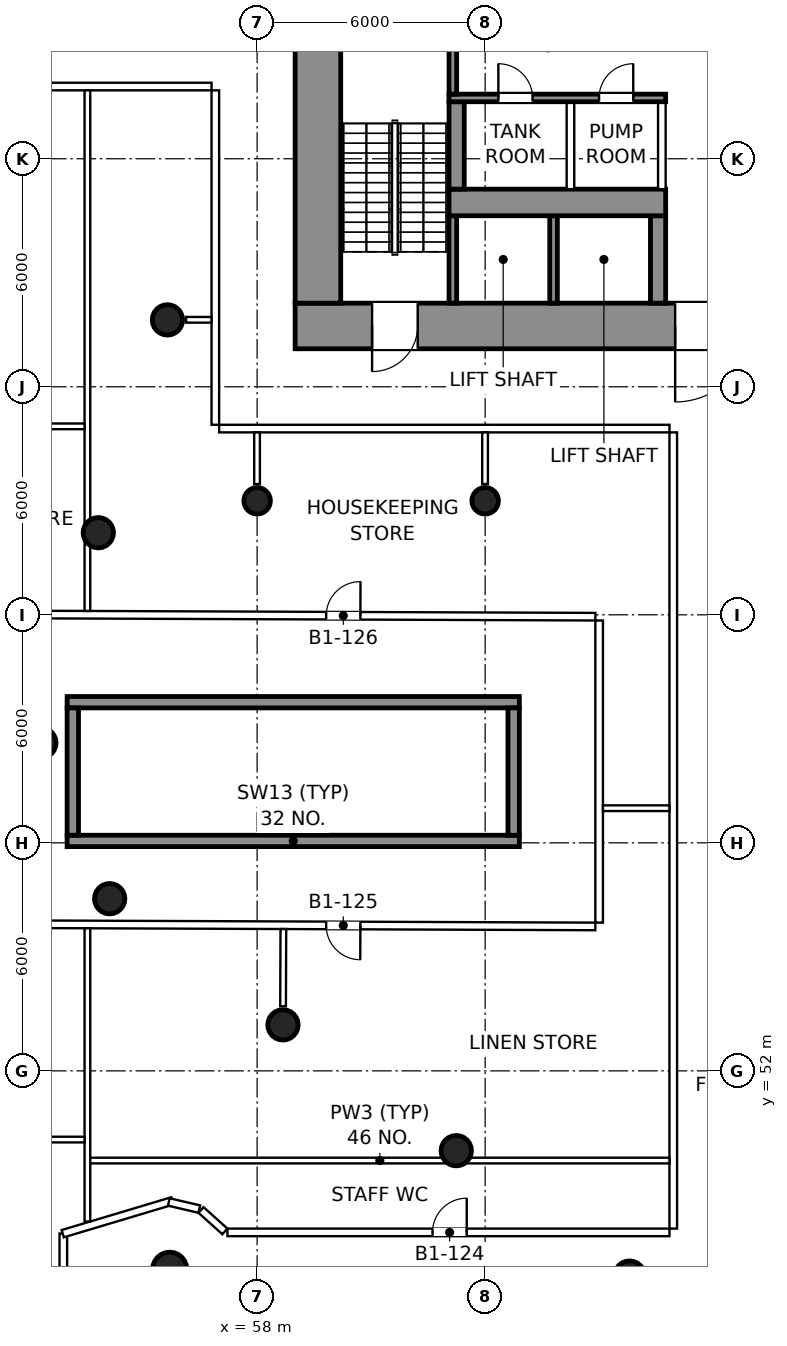
"""IFC4 building model, lengths in metres.
Left out: names, types, materials, properties, quantities, classifications, styles, units other than length and angle.
Written with IfcOpenShell. Run it as: python <this file> out.ifc"""

import sys

from ifc_helpers import new_model, si_unit, direction, frame, frame_2d, origin, origin_2d, place, context, subcontext, project, spatial, rectangle, circle, extrude, element, fill, save


model = new_model("IFC4")
c1 = context("Model", 3, precision=1e-05, world=origin(), true_north=direction((0.0, 1.0)))
c2 = subcontext(c1, "Body", "Model", "MODEL_VIEW")
j1 = project(units=[si_unit("LENGTHUNIT", "METRE"), si_unit("PLANEANGLEUNIT", "RADIAN")], contexts=[c1])
p1 = place(None, origin())
s1 = spatial("IfcSite", under=j1, at=p1, CompositionType="ELEMENT")
p2 = place(p1, origin())
s2 = spatial("IfcBuilding", under=s1, at=p2, CompositionType="ELEMENT")
p3 = place(p2, frame((0.0, 0.0, -5.0)))
s3 = spatial("IfcBuildingStorey", under=s2, at=p3, CompositionType="ELEMENT", Elevation=-5.0)
p4 = place(p3, frame((55.7, 46.78, 0.0), z_axis=(0.0, 0.0, 1.0), x_axis=(1.0, 0.0, 0.0)))
e1 = element("IfcColumn", 1, at=p4, inside=s3, PredefinedType="COLUMN", context=c2, shape_type="SweptSolid", body=[
    extrude(circle(Radius=0.45, at=origin_2d()), origin(), (0.0, 0.0, 1.0), 5.0),
])
for number, where, z_axis, x_axis in (
    (2, (52.31, 60.63, 0.0), (0.0, 0.0, 1.0), (1.0, 0.0, 0.0)),
    (3, (54.12, 56.53, 0.0), (0.0, 0.0, 1.0), (1.0, 0.0, 0.0)),
    (4, (58.68, 53.21, 0.0), (0.0, 0.0, 1.0), (1.0, 0.0, 0.0)),
    (5, (63.24, 49.9, 0.0), (0.0, 0.0, 1.0), (1.0, 0.0, 0.0)),
    (6, (67.8, 46.6, 0.0), (0.0, 0.0, 1.0), (1.0, 0.0, 0.0)),
    (7, (55.64, 71.76, 0.0), (0.0, 0.0, 1.0), (1.0, 0.0, 0.0)),
    (8, (53.82, 66.16, 0.0), (0.0, 0.0, 1.0), (1.0, 0.0, 0.0)),
):
    element("IfcColumn", number, at=place(p3, frame(where, z_axis=z_axis, x_axis=x_axis)), inside=s3, PredefinedType="COLUMN", context=c2, shape_type="SweptSolid", body=[
        extrude(circle(Radius=0.4, at=origin_2d()), origin(), (0.0, 0.0, 1.0), 5.0),
    ])
for number, where, z_axis, x_axis in (
    (9, (58.0, 67.0, 0.0), (0.0, 0.0, 1.0), (1.0, 0.0, 0.0)),
    (10, (64.0, 67.0, 0.0), (0.0, 0.0, 1.0), (1.0, 0.0, 0.0)),
):
    element("IfcColumn", number, at=place(p3, frame(where, z_axis=z_axis, x_axis=x_axis)), inside=s3, PredefinedType="COLUMN", context=c2, shape_type="SweptSolid", body=[
        extrude(circle(Radius=0.35, at=origin_2d()), origin(), (0.0, 0.0, 1.0), 5.0),
    ])
p5 = place(p3, frame((59.0, 71.6, 0.0), z_axis=(0.0, 0.0, 1.0), x_axis=(1.0, 0.0, 0.0)))
e11 = element("IfcWall", 11, at=p5, inside=s3, PredefinedType="SHEAR", context=c2, shape_type="SweptSolid", body=[
    extrude(rectangle(XDim=22.0, YDim=1.2, at=frame_2d((11.0, 0.0))), origin(), (0.0, 0.0, 1.0), 5.0),
])
p6 = place(p5, frame((2.025, 0.0, 0.0)))
e12 = element("IfcOpeningElement", 12, at=p6, cuts=e11, PredefinedType="OPENING", context=c2, shape_type="SweptSolid", body=[
    extrude(rectangle(XDim=1.2, YDim=2.1, at=frame_2d((0.6, 1.05))), frame((0.0, 0.61, 0.0), z_axis=(0.0, -1.0, 0.0), x_axis=(1.0, 0.0, 0.0)), (0.0, 0.0, 1.0), 1.22),
])
p7 = place(p5, frame((18.775, 0.0, 0.0)))
e13 = element("IfcOpeningElement", 13, at=p7, cuts=e11, PredefinedType="OPENING", context=c2, shape_type="SweptSolid", body=[
    extrude(rectangle(XDim=1.2, YDim=2.1, at=frame_2d((0.6, 1.05))), frame((0.0, 0.61, 0.0), z_axis=(0.0, -1.0, 0.0), x_axis=(1.0, 0.0, 0.0)), (0.0, 0.0, 1.0), 1.22),
])
p8 = place(p5, frame((10.0, 0.0, 0.0)))
e14 = element("IfcOpeningElement", 14, at=p8, cuts=e11, PredefinedType="OPENING", context=c2, shape_type="SweptSolid", body=[
    extrude(rectangle(XDim=2.0, YDim=2.1, at=frame_2d((1.0, 1.05))), frame((0.0, 0.61, 0.0), z_axis=(0.0, -1.0, 0.0), x_axis=(1.0, 0.0, 0.0)), (0.0, 0.0, 1.0), 1.22),
])
p9 = place(p3, frame((59.6, 72.2, 0.0), z_axis=(0.0, 0.0, 1.0), x_axis=(0.0, 1.0, 0.0)))
e15 = element("IfcWall", 15, at=p9, inside=s3, PredefinedType="SHEAR", context=c2, shape_type="SweptSolid", body=[
    extrude(rectangle(XDim=8.7, YDim=1.2, at=frame_2d((4.35, 0.0))), origin(), (0.0, 0.0, 1.0), 5.0),
])
for number, where, z_axis, x_axis in (
    (16, (63.15, 72.2, 0.0), (0.0, 0.0, 1.0), (0.0, 1.0, 0.0)),
    (17, (65.8, 72.2, 0.0), (0.0, 0.0, 1.0), (0.0, 1.0, 0.0)),
):
    element("IfcWall", number, at=place(p3, frame(where, z_axis=z_axis, x_axis=x_axis)), inside=s3, PredefinedType="SHEAR", context=c2, shape_type="SweptSolid", body=[
        extrude(rectangle(XDim=2.3, YDim=0.2, at=frame_2d((1.15, 0.0))), origin(), (0.0, 0.0, 1.0), 5.0),
    ])
p10 = place(p3, frame((68.55, 72.2, 0.0), z_axis=(0.0, 0.0, 1.0), x_axis=(0.0, 1.0, 0.0)))
e18 = element("IfcWall", 18, at=p10, inside=s3, PredefinedType="SHEAR", context=c2, shape_type="SweptSolid", body=[
    extrude(rectangle(XDim=2.3, YDim=0.4, at=frame_2d((1.15, 0.0))), origin(), (0.0, 0.0, 1.0), 5.0),
])
p11 = place(p3, frame((63.05, 74.85, 0.0), z_axis=(0.0, 0.0, 1.0), x_axis=(1.0, 0.0, 0.0)))
e19 = element("IfcWall", 19, at=p11, inside=s3, PredefinedType="SHEAR", context=c2, shape_type="SweptSolid", body=[
    extrude(rectangle(XDim=5.7, YDim=0.7, at=frame_2d((2.85, 0.0))), origin(), (0.0, 0.0, 1.0), 5.0),
])
p12 = place(p3, frame((63.25, 75.2, 0.0), z_axis=(0.0, 0.0, 1.0), x_axis=(0.0, 1.0, 0.0)))
e20 = element("IfcWall", 20, at=p12, inside=s3, PredefinedType="SHEAR", context=c2, shape_type="SweptSolid", body=[
    extrude(rectangle(XDim=2.3, YDim=0.4, at=frame_2d((1.15, 0.0))), origin(), (0.0, 0.0, 1.0), 5.0),
])
for number, where, z_axis, x_axis in (
    (21, (66.245, 75.2, 0.0), (0.0, 0.0, 1.0), (0.0, 1.0, 0.0)),
    (22, (68.65, 75.2, 0.0), (0.0, 0.0, 1.0), (0.0, 1.0, 0.0)),
):
    element("IfcWall", number, at=place(p3, frame(where, z_axis=z_axis, x_axis=x_axis)), inside=s3, PredefinedType="PARTITIONING", context=c2, shape_type="SweptSolid", body=[
        extrude(rectangle(XDim=2.3, YDim=0.2, at=frame_2d((1.15, 0.0))), origin(), (0.0, 0.0, 1.0), 4.55),
    ])
p13 = place(p3, frame((63.05, 77.6, 0.0), z_axis=(0.0, 0.0, 1.0), x_axis=(1.0, 0.0, 0.0)))
e23 = element("IfcWall", 23, at=p13, inside=s3, PredefinedType="SHEAR", context=c2, shape_type="SweptSolid", body=[
    extrude(rectangle(XDim=5.7, YDim=0.2, at=frame_2d((2.85, 0.0))), origin(), (0.0, 0.0, 1.0), 5.0),
])
p14 = place(p13, frame((1.298, 0.0, 0.0)))
e24 = element("IfcOpeningElement", 24, at=p14, cuts=e23, PredefinedType="OPENING", context=c2, shape_type="SweptSolid", body=[
    extrude(rectangle(XDim=0.9, YDim=2.1, at=frame_2d((0.45, 1.05))), frame((0.0, 0.11, 0.0), z_axis=(0.0, -1.0, 0.0), x_axis=(1.0, 0.0, 0.0)), (0.0, 0.0, 1.0), 0.22),
])
p15 = place(p13, frame((3.948, 0.0, 0.0)))
e25 = element("IfcOpeningElement", 25, at=p15, cuts=e23, PredefinedType="OPENING", context=c2, shape_type="SweptSolid", body=[
    extrude(rectangle(XDim=0.9, YDim=2.1, at=frame_2d((0.45, 1.05))), frame((0.0, 0.11, 0.0), z_axis=(0.0, -1.0, 0.0), x_axis=(1.0, 0.0, 0.0)), (0.0, 0.0, 1.0), 0.22),
])
p16 = place(p3, frame((63.15, 77.7, 0.0), z_axis=(0.0, 0.0, 1.0), x_axis=(0.0, 1.0, 0.0)))
e26 = element("IfcWall", 26, at=p16, inside=s3, PredefinedType="SHEAR", context=c2, shape_type="SweptSolid", body=[
    extrude(rectangle(XDim=3.2, YDim=0.2, at=frame_2d((1.6, 0.0))), origin(), (0.0, 0.0, 1.0), 5.0),
])
for number, where, z_axis, x_axis in (
    (27, (53.0, 58.05, 0.0), (0.0, 0.0, 1.0), (1.0, 0.0, 0.0)),
    (28, (53.0, 61.7, 0.0), (0.0, 0.0, 1.0), (1.0, 0.0, 0.0)),
):
    element("IfcWall", number, at=place(p3, frame(where, z_axis=z_axis, x_axis=x_axis)), inside=s3, PredefinedType="SHEAR", context=c2, shape_type="SweptSolid", body=[
        extrude(rectangle(XDim=11.9, YDim=0.3, at=frame_2d((5.95, 0.0))), origin(), (0.0, 0.0, 1.0), 4.55),
    ])
for number, where, z_axis, x_axis in (
    (29, (53.15, 58.2, 0.0), (0.0, 0.0, 1.0), (0.0, 1.0, 0.0)),
    (30, (64.75, 58.2, 0.0), (0.0, 0.0, 1.0), (0.0, 1.0, 0.0)),
):
    element("IfcWall", number, at=place(p3, frame(where, z_axis=z_axis, x_axis=x_axis)), inside=s3, PredefinedType="SHEAR", context=c2, shape_type="SweptSolid", body=[
        extrude(rectangle(XDim=3.35, YDim=0.3, at=frame_2d((1.675, 0.0))), origin(), (0.0, 0.0, 1.0), 4.55),
    ])
p17 = place(p3, frame((63.17, 31.88, 0.0), z_axis=(0.0, 0.0, 1.0), x_axis=(-0.809016646189, 0.587785731529, 0.0)))
e31 = element("IfcWall", 31, at=p17, inside=s3, PredefinedType="PARTITIONING", context=c2, shape_type="SweptSolid", body=[
    extrude(rectangle(XDim=26.708, YDim=0.2, at=frame_2d((13.354, 0.0))), origin(), (0.0, 0.0, 1.0), 4.55),
])
p18 = place(p17, frame((21.097, 0.0, 0.0)))
e32 = element("IfcOpeningElement", 32, at=p18, cuts=e31, PredefinedType="OPENING", context=c2, shape_type="SweptSolid", body=[
    extrude(rectangle(XDim=0.9, YDim=2.1, at=frame_2d((0.45, 1.05))), frame((0.0, 0.11, 0.0), z_axis=(0.0, -1.0, 0.0), x_axis=(1.0, 0.0, 0.0)), (0.0, 0.0, 1.0), 0.22),
])
p19 = place(p17, frame((11.479, 0.0, 0.0)))
e33 = element("IfcOpeningElement", 33, at=p19, cuts=e31, PredefinedType="OPENING", context=c2, shape_type="SweptSolid", body=[
    extrude(rectangle(XDim=0.9, YDim=2.1, at=frame_2d((0.45, 1.05))), frame((0.0, 0.11, 0.0), z_axis=(0.0, -1.0, 0.0), x_axis=(1.0, 0.0, 0.0)), (0.0, 0.0, 1.0), 0.22),
])
p20 = place(p17, frame((3.211, 0.0, 0.0)))
e34 = element("IfcOpeningElement", 34, at=p20, cuts=e31, PredefinedType="OPENING", context=c2, shape_type="SweptSolid", body=[
    extrude(rectangle(XDim=0.9, YDim=2.1, at=frame_2d((0.45, 1.05))), frame((0.0, 0.11, 0.0), z_axis=(0.0, -1.0, 0.0), x_axis=(1.0, 0.0, 0.0)), (0.0, 0.0, 1.0), 0.22),
])
p21 = place(p3, frame((67.0, 63.85, 0.0), z_axis=(0.0, 0.0, 1.0), x_axis=(0.0, -1.0, 0.0)))
e35 = element("IfcWall", 35, at=p21, inside=s3, PredefinedType="PARTITIONING", context=c2, shape_type="SweptSolid", body=[
    extrude(rectangle(XDim=7.95, YDim=0.2, at=frame_2d((3.975, 0.0))), origin(), (0.0, 0.0, 1.0), 4.55),
])
p22 = place(p3, frame((66.9, 55.8, 0.0), z_axis=(0.0, 0.0, 1.0), x_axis=(-0.999992570732, 0.003854670107, 0.0)))
e36 = element("IfcWall", 36, at=p22, inside=s3, PredefinedType="PARTITIONING", context=c2, shape_type="SweptSolid", body=[
    extrude(rectangle(XDim=25.715, YDim=0.2, at=frame_2d((12.857, 0.0))), origin(), (0.0, 0.0, 1.0), 3.75),
])
p23 = place(p22, frame((6.183, 0.0, 0.0)))
e37 = element("IfcOpeningElement", 37, at=p23, cuts=e36, PredefinedType="OPENING", context=c2, shape_type="SweptSolid", body=[
    extrude(rectangle(XDim=0.9, YDim=2.1, at=frame_2d((0.45, 1.05))), frame((0.0, 0.11, 0.0), z_axis=(0.0, -1.0, 0.0), x_axis=(1.0, 0.0, 0.0)), (0.0, 0.0, 1.0), 0.22),
])
p24 = place(p3, frame((43.349, 48.877, 0.0), z_axis=(0.0, 0.0, 1.0), x_axis=(0.809017904923, -0.587783999028, 0.0)))
e38 = element("IfcWall", 38, at=p24, inside=s3, PredefinedType="PARTITIONING", context=c2, shape_type="SweptSolid", body=[
    extrude(rectangle(XDim=11.609, YDim=0.2, at=frame_2d((5.805, 0.0))), origin(), (0.0, 0.0, 1.0), 3.85),
])
p25 = place(p24, frame((5.436, 0.0, 0.0)))
e39 = element("IfcOpeningElement", 39, at=p25, cuts=e38, PredefinedType="OPENING", context=c2, shape_type="SweptSolid", body=[
    extrude(rectangle(XDim=0.9, YDim=2.1, at=frame_2d((0.45, 1.05))), frame((0.0, 0.11, 0.0), z_axis=(0.0, -1.0, 0.0), x_axis=(1.0, 0.0, 0.0)), (0.0, 0.0, 1.0), 0.22),
])
p26 = place(p3, frame((52.9, 42.134, 0.0), z_axis=(0.0, 0.0, 1.0), x_axis=(0.0, 1.0, 0.0)))
e40 = element("IfcWall", 40, at=p26, inside=s3, PredefinedType="PARTITIONING", context=c2, shape_type="SweptSolid", body=[
    extrude(rectangle(XDim=5.586, YDim=0.2, at=frame_2d((2.793, 0.0))), origin(), (0.0, 0.0, 1.0), 3.85),
])
p27 = place(p3, frame((52.885, 47.716, 0.0), z_axis=(0.0, 0.0, 1.0), x_axis=(0.958064878425, 0.286551371885, 0.0)))
e41 = element("IfcWall", 41, at=p27, inside=s3, PredefinedType="PARTITIONING", context=c2, shape_type="SweptSolid", body=[
    extrude(rectangle(XDim=3.009, YDim=0.2, at=frame_2d((1.505, 0.0))), origin(), (0.0, 0.0, 1.0), 3.85),
])
p28 = place(p3, frame((55.676, 48.55, 0.0), z_axis=(0.0, 0.0, 1.0), x_axis=(0.973904551026, -0.226957981772, 0.0)))
e42 = element("IfcWall", 42, at=p28, inside=s3, PredefinedType="PARTITIONING", context=c2, shape_type="SweptSolid", body=[
    extrude(rectangle(XDim=0.824, YDim=0.2, at=frame_2d((0.412, 0.0))), origin(), (0.0, 0.0, 1.0), 4.55),
])
p29 = place(p3, frame((56.522, 48.34, 0.0), z_axis=(0.0, 0.0, 1.0), x_axis=(0.744440847373, -0.667688418923, 0.0)))
e43 = element("IfcWall", 43, at=p29, inside=s3, PredefinedType="PARTITIONING", context=c2, shape_type="SweptSolid", body=[
    extrude(rectangle(XDim=0.846, YDim=0.2, at=frame_2d((0.423, 0.0))), origin(), (0.0, 0.0, 1.0), 4.55),
])
p30 = place(p3, frame((57.219, 47.75, 0.0), z_axis=(0.0, 0.0, 1.0), x_axis=(1.0, 0.0, 0.0)))
e44 = element("IfcWall", 44, at=p30, inside=s3, PredefinedType="PARTITIONING", context=c2, shape_type="SweptSolid", body=[
    extrude(rectangle(XDim=11.631, YDim=0.2, at=frame_2d((5.815, 0.0))), origin(), (0.0, 0.0, 1.0), 3.75),
])
p31 = place(p30, frame((5.396, 0.0, 0.0)))
e45 = element("IfcOpeningElement", 45, at=p31, cuts=e44, PredefinedType="OPENING", context=c2, shape_type="SweptSolid", body=[
    extrude(rectangle(XDim=0.9, YDim=2.1, at=frame_2d((0.45, 1.05))), frame((0.0, 0.11, 0.0), z_axis=(0.0, -1.0, 0.0), x_axis=(1.0, 0.0, 0.0)), (0.0, 0.0, 1.0), 0.22),
])
p32 = place(p3, frame((68.95, 47.85, 0.0), z_axis=(0.0, 0.0, 1.0), x_axis=(0.0, 1.0, 0.0)))
e46 = element("IfcWall", 46, at=p32, inside=s3, PredefinedType="PARTITIONING", context=c2, shape_type="SweptSolid", body=[
    extrude(rectangle(XDim=20.95, YDim=0.2, at=frame_2d((10.475, 0.0))), origin(), (0.0, 0.0, 1.0), 4.55),
])
p33 = place(p3, frame((68.85, 68.9, 0.0), z_axis=(0.0, 0.0, 1.0), x_axis=(-1.0, 0.0, 0.0)))
e47 = element("IfcWall", 47, at=p33, inside=s3, PredefinedType="PARTITIONING", context=c2, shape_type="SweptSolid", body=[
    extrude(rectangle(XDim=11.85, YDim=0.2, at=frame_2d((5.925, 0.0))), origin(), (0.0, 0.0, 1.0), 4.55),
])
p34 = place(p3, frame((56.9, 69.0, 0.0), z_axis=(0.0, 0.0, 1.0), x_axis=(0.0, 1.0, 0.0)))
e48 = element("IfcWall", 48, at=p34, inside=s3, PredefinedType="PARTITIONING", context=c2, shape_type="SweptSolid", body=[
    extrude(rectangle(XDim=8.8, YDim=0.2, at=frame_2d((4.4, 0.0))), origin(), (0.0, 0.0, 1.0), 3.75),
])
p35 = place(p3, frame((56.8, 77.9, 0.0), z_axis=(0.0, 0.0, 1.0), x_axis=(-1.0, 0.0, 0.0)))
e49 = element("IfcWall", 49, at=p35, inside=s3, PredefinedType="PARTITIONING", context=c2, shape_type="SweptSolid", body=[
    extrude(rectangle(XDim=11.547, YDim=0.2, at=frame_2d((5.773, 0.0))), origin(), (0.0, 0.0, 1.0), 4.55),
])
p36 = place(p3, frame((40.817, 64.05, 0.0), z_axis=(0.0, 0.0, 1.0), x_axis=(0.999992779253, -0.003800189715, 0.0)))
e50 = element("IfcWall", 50, at=p36, inside=s3, PredefinedType="PARTITIONING", context=c2, shape_type="SweptSolid", body=[
    extrude(rectangle(XDim=26.083, YDim=0.2, at=frame_2d((13.042, 0.0))), origin(), (0.0, 0.0, 1.0), 3.75),
])
p37 = place(p36, frame((3.973, 0.0, 0.0)))
e51 = element("IfcOpeningElement", 51, at=p37, cuts=e50, PredefinedType="OPENING", context=c2, shape_type="SweptSolid", body=[
    extrude(rectangle(XDim=0.9, YDim=2.1, at=frame_2d((0.45, 1.05))), frame((0.0, 0.11, 0.0), z_axis=(0.0, -1.0, 0.0), x_axis=(1.0, 0.0, 0.0)), (0.0, 0.0, 1.0), 0.22),
])
p38 = place(p36, frame((19.0, 0.0, 0.0)))
e52 = element("IfcOpeningElement", 52, at=p38, cuts=e50, PredefinedType="OPENING", context=c2, shape_type="SweptSolid", body=[
    extrude(rectangle(XDim=0.9, YDim=2.1, at=frame_2d((0.45, 1.05))), frame((0.0, 0.11, 0.0), z_axis=(0.0, -1.0, 0.0), x_axis=(1.0, 0.0, 0.0)), (0.0, 0.0, 1.0), 0.22),
])
p39 = place(p3, frame((53.534, 48.037, 0.0), z_axis=(0.0, 0.0, 1.0), x_axis=(0.0, 1.0, 0.0)))
e53 = element("IfcWall", 53, at=p39, inside=s3, PredefinedType="PARTITIONING", context=c2, shape_type="SweptSolid", body=[
    extrude(rectangle(XDim=7.715, YDim=0.15, at=frame_2d((3.857, 0.0))), origin(), (0.0, 0.0, 1.0), 3.85),
])
p40 = place(p3, frame((53.534, 64.101, 0.0), z_axis=(0.0, 0.0, 1.0), x_axis=(0.0, 1.0, 0.0)))
e54 = element("IfcWall", 54, at=p40, inside=s3, PredefinedType="PARTITIONING", context=c2, shape_type="SweptSolid", body=[
    extrude(rectangle(XDim=13.699, YDim=0.15, at=frame_2d((6.849, 0.0))), origin(), (0.0, 0.0, 1.0), 3.75),
])
p41 = place(p3, frame((53.609, 49.64, 0.0), z_axis=(0.0, 0.0, 1.0), x_axis=(1.0, 0.0, 0.0)))
e55 = element("IfcWall", 55, at=p41, inside=s3, PredefinedType="PARTITIONING", context=c2, shape_type="SweptSolid", body=[
    extrude(rectangle(XDim=15.241, YDim=0.15, at=frame_2d((7.621, 0.0))), origin(), (0.0, 0.0, 1.0), 3.75),
])
p42 = place(p3, frame((67.1, 58.911, 0.0), z_axis=(0.0, 0.0, 1.0), x_axis=(1.0, 0.0, 0.0)))
e56 = element("IfcWall", 56, at=p42, inside=s3, PredefinedType="PARTITIONING", context=c2, shape_type="SweptSolid", body=[
    extrude(rectangle(XDim=1.75, YDim=0.15, at=frame_2d((0.875, 0.0))), origin(), (0.0, 0.0, 1.0), 4.55),
])
p43 = place(p3, frame((42.405, 68.958, 0.0), z_axis=(0.0, 0.0, 1.0), x_axis=(1.0, 0.0, 0.0)))
e57 = element("IfcWall", 57, at=p43, inside=s3, PredefinedType="PARTITIONING", context=c2, shape_type="SweptSolid", body=[
    extrude(rectangle(XDim=11.054, YDim=0.15, at=frame_2d((5.527, 0.0))), origin(), (0.0, 0.0, 1.0), 3.85),
])
p44 = place(p3, frame((51.56, 50.192, 0.0), z_axis=(0.0, 0.0, 1.0), x_axis=(1.0, 0.0, 0.0)))
e58 = element("IfcWall", 58, at=p44, inside=s3, PredefinedType="PARTITIONING", context=c2, shape_type="SweptSolid", body=[
    extrude(rectangle(XDim=1.899, YDim=0.15, at=frame_2d((0.949, 0.0))), origin(), (0.0, 0.0, 1.0), 4.55),
])
p45 = place(p3, frame((58.682, 53.7, 0.0), z_axis=(0.0, 0.0, 1.0), x_axis=(0.003844739095, 0.999992608963, 0.0)))
e59 = element("IfcWall", 59, at=p45, inside=s3, PredefinedType="PARTITIONING", context=c2, shape_type="SweptSolid", body=[
    extrude(rectangle(XDim=2.032, YDim=0.15, at=frame_2d((1.016, 0.0))), origin(), (0.0, 0.0, 1.0), 4.55),
])
p46 = place(p3, frame((56.13, 71.762, 0.0), z_axis=(0.0, 0.0, 1.0), x_axis=(1.0, 0.0, 0.0)))
e60 = element("IfcWall", 60, at=p46, inside=s3, PredefinedType="PARTITIONING", context=c2, shape_type="SweptSolid", body=[
    extrude(rectangle(XDim=0.67, YDim=0.15, at=frame_2d((0.335, 0.0))), origin(), (0.0, 0.0, 1.0), 3.75),
])
for number, where, z_axis, x_axis in (
    (61, (57.998, 67.44, 0.0), (0.0, 0.0, 1.0), (0.0, 1.0, 0.0)),
    (62, (63.998, 67.44, 0.0), (0.0, 0.0, 1.0), (0.0, 1.0, 0.0)),
):
    element("IfcWall", number, at=place(p3, frame(where, z_axis=z_axis, x_axis=x_axis)), inside=s3, PredefinedType="PARTITIONING", context=c2, shape_type="SweptSolid", body=[
        extrude(rectangle(XDim=1.36, YDim=0.15, at=frame_2d((0.68, 0.0))), origin(), (0.0, 0.0, 1.0), 4.55),
    ])
p47 = place(p6, frame((1.2, 0.0, 0.0), z_axis=(0.0, 0.0, 1.0), x_axis=(-1.0, 0.0, 0.0)))
e63 = element("IfcDoor", 63, at=p47, inside=s3, OperationType="SINGLE_SWING_RIGHT", PredefinedType="DOOR", context=c2, shape_type="SweptSolid", body=[
    extrude(rectangle(XDim=1.2, YDim=2.1, at=frame_2d((0.6, 1.05))), frame((0.0, 0.025, 0.0), z_axis=(0.0, -1.0, 0.0), x_axis=(1.0, 0.0, 0.0)), (0.0, 0.0, 1.0), 0.05),
])
fill(e12, e63)
p48 = place(p8, frame((2.0, 0.0, 0.0), z_axis=(0.0, 0.0, 1.0), x_axis=(-1.0, 0.0, 0.0)))
e64 = element("IfcDoor", 64, at=p48, inside=s3, OperationType="DOUBLE_DOOR_SINGLE_SWING", PredefinedType="DOOR", context=c2, shape_type="SweptSolid", body=[
    extrude(rectangle(XDim=2.0, YDim=2.1, at=frame_2d((1.0, 1.05))), frame((0.0, 0.025, 0.0), z_axis=(0.0, -1.0, 0.0), x_axis=(1.0, 0.0, 0.0)), (0.0, 0.0, 1.0), 0.05),
])
fill(e14, e64)
p49 = place(p14, origin())
e65 = element("IfcDoor", 65, at=p49, inside=s3, OperationType="SINGLE_SWING_LEFT", PredefinedType="DOOR", context=c2, shape_type="SweptSolid", body=[
    extrude(rectangle(XDim=0.9, YDim=2.1, at=frame_2d((0.45, 1.05))), frame((0.0, 0.025, 0.0), z_axis=(0.0, -1.0, 0.0), x_axis=(1.0, 0.0, 0.0)), (0.0, 0.0, 1.0), 0.05),
])
fill(e24, e65)
p50 = place(p15, origin())
e66 = element("IfcDoor", 66, at=p50, inside=s3, OperationType="SINGLE_SWING_RIGHT", PredefinedType="DOOR", context=c2, shape_type="SweptSolid", body=[
    extrude(rectangle(XDim=0.9, YDim=2.1, at=frame_2d((0.45, 1.05))), frame((0.0, 0.025, 0.0), z_axis=(0.0, -1.0, 0.0), x_axis=(1.0, 0.0, 0.0)), (0.0, 0.0, 1.0), 0.05),
])
fill(e25, e66)
p51 = place(p31, origin())
e67 = element("IfcDoor", 67, at=p51, inside=s3, OperationType="SINGLE_SWING_RIGHT", PredefinedType="DOOR", context=c2, shape_type="SweptSolid", body=[
    extrude(rectangle(XDim=0.9, YDim=2.1, at=frame_2d((0.45, 1.05))), frame((0.0, 0.025, 0.0), z_axis=(0.0, -1.0, 0.0), x_axis=(1.0, 0.0, 0.0)), (0.0, 0.0, 1.0), 0.05),
])
fill(e45, e67)
p52 = place(p23, origin())
e68 = element("IfcDoor", 68, at=p52, inside=s3, OperationType="SINGLE_SWING_LEFT", PredefinedType="DOOR", context=c2, shape_type="SweptSolid", body=[
    extrude(rectangle(XDim=0.9, YDim=2.1, at=frame_2d((0.45, 1.05))), frame((0.0, 0.025, 0.0), z_axis=(0.0, -1.0, 0.0), x_axis=(1.0, 0.0, 0.0)), (0.0, 0.0, 1.0), 0.05),
])
fill(e37, e68)
p53 = place(p38, origin())
e69 = element("IfcDoor", 69, at=p53, inside=s3, OperationType="SINGLE_SWING_RIGHT", PredefinedType="DOOR", context=c2, shape_type="SweptSolid", body=[
    extrude(rectangle(XDim=0.9, YDim=2.1, at=frame_2d((0.45, 1.05))), frame((0.0, 0.025, 0.0), z_axis=(0.0, -1.0, 0.0), x_axis=(1.0, 0.0, 0.0)), (0.0, 0.0, 1.0), 0.05),
])
fill(e52, e69)
save(model, sys.argv[1])
